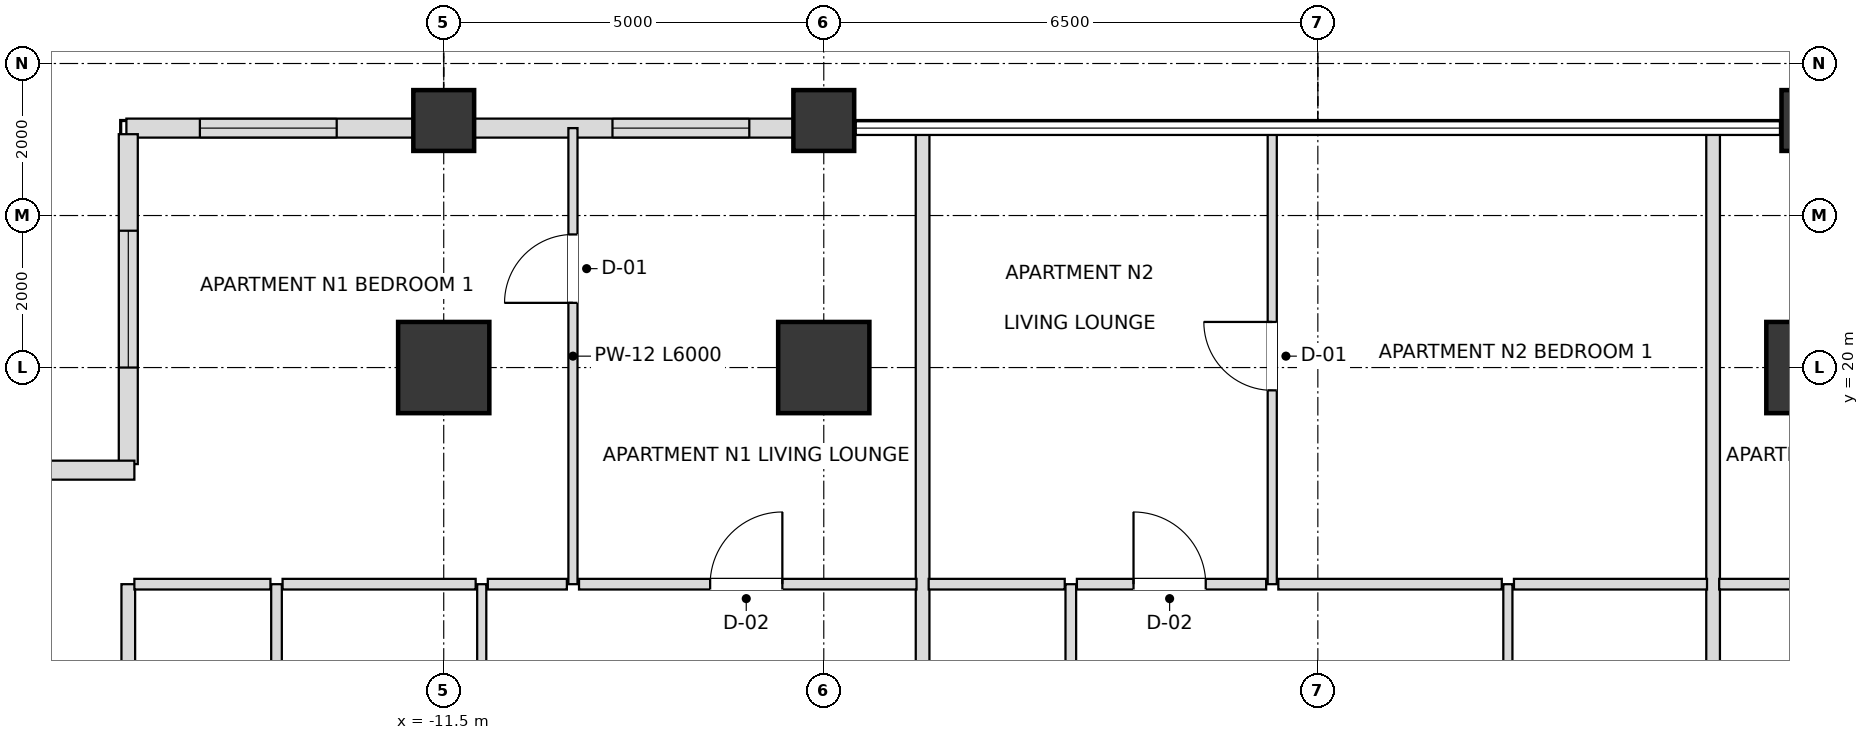
"""IFC4 building model, lengths in metres.
Left out: names, types, materials, properties, quantities, classifications, styles, units other than length and angle.
Written with IfcOpenShell. Run it as: python <this file> out.ifc"""

import sys

from ifc_helpers import new_model, si_unit, direction, frame, frame_2d, origin, origin_2d, place, context, subcontext, project, spatial, rectangle, extrude, element, fill, save


model = new_model("IFC4")
c1 = context("Model", 3, precision=1e-05, world=origin(), true_north=direction((0.0, 1.0)))
c2 = subcontext(c1, "Body", "Model", "MODEL_VIEW")
j1 = project(units=[si_unit("LENGTHUNIT", "METRE"), si_unit("PLANEANGLEUNIT", "RADIAN")], contexts=[c1])
p1 = place(None, origin())
s1 = spatial("IfcSite", under=j1, at=p1, CompositionType="ELEMENT")
p2 = place(p1, origin())
s2 = spatial("IfcBuilding", under=s1, at=p2, CompositionType="ELEMENT")
p3 = place(p2, frame((0.0, 0.0, 109.8)))
s3 = spatial("IfcBuildingStorey", under=s2, at=p3, CompositionType="ELEMENT", Elevation=109.8)
for number, where, z_axis, x_axis in (
    (1, (6.5, 20.0, 0.0), (0.0, 0.0, 1.0), (1.0, 0.0, 0.0)),
    (2, (-6.5, 20.0, 0.0), (0.0, 0.0, 1.0), (1.0, 0.0, 0.0)),
    (3, (-11.5, 20.0, 0.0), (0.0, 0.0, 1.0), (1.0, 0.0, 0.0)),
):
    element("IfcColumn", number, at=place(p3, frame(where, z_axis=z_axis, x_axis=x_axis)), inside=s3, PredefinedType="USERDEFINED", context=c2, shape_type="SweptSolid", body=[
        extrude(rectangle(XDim=1.2, YDim=1.2, at=origin_2d()), origin(), (0.0, 0.0, 1.0), 3.6),
    ])
for number, where, z_axis, x_axis in (
    (4, (-11.5, 23.25, 0.0), (0.0, 0.0, 1.0), (1.0, 0.0, 0.0)),
    (5, (-6.5, 23.25, 0.0), (0.0, 0.0, 1.0), (1.0, 0.0, 0.0)),
    (6, (6.5, 23.25, 0.0), (0.0, 0.0, 1.0), (1.0, 0.0, 0.0)),
):
    element("IfcColumn", number, at=place(p3, frame(where, z_axis=z_axis, x_axis=x_axis)), inside=s3, PredefinedType="COLUMN", context=c2, shape_type="SweptSolid", body=[
        extrude(rectangle(XDim=0.8, YDim=0.8, at=origin_2d()), origin(), (0.0, 0.0, 1.0), 3.6),
    ])
p4 = place(p3, frame((-6.895, 23.15, 0.0), z_axis=(0.0, 0.0, 1.0), x_axis=(-1.0, 0.0, 0.0)))
e7 = element("IfcWall", 7, at=p4, inside=s3, PredefinedType="SOLIDWALL", context=c2, shape_type="SweptSolid", body=[
    extrude(rectangle(XDim=4.21, YDim=0.25, at=frame_2d((2.105, 0.0))), origin(), (0.0, 0.0, 1.0), 2.736),
])
p5 = place(p4, frame((0.585, 0.0, 0.72)))
e8 = element("IfcOpeningElement", 8, at=p5, cuts=e7, PredefinedType="OPENING", context=c2, shape_type="SweptSolid", body=[
    extrude(rectangle(XDim=1.8, YDim=1.68, at=frame_2d((0.9, 0.84))), frame((0.0, 0.135, 0.0), z_axis=(0.0, -1.0, 0.0), x_axis=(1.0, 0.0, 0.0)), (0.0, 0.0, 1.0), 0.27),
])
p6 = place(p3, frame((-11.895, 23.15, 0.0), z_axis=(0.0, 0.0, 1.0), x_axis=(-1.0, 0.0, 0.0)))
e9 = element("IfcWall", 9, at=p6, inside=s3, PredefinedType="SOLIDWALL", context=c2, shape_type="SweptSolid", body=[
    extrude(rectangle(XDim=3.78, YDim=0.25, at=frame_2d((1.89, 0.0))), origin(), (0.0, 0.0, 1.0), 2.736),
])
p7 = place(p6, frame((1.013, 0.0, 0.72)))
e10 = element("IfcOpeningElement", 10, at=p7, cuts=e9, PredefinedType="OPENING", context=c2, shape_type="SweptSolid", body=[
    extrude(rectangle(XDim=1.8, YDim=1.68, at=frame_2d((0.9, 0.84))), frame((0.0, 0.135, 0.0), z_axis=(0.0, -1.0, 0.0), x_axis=(1.0, 0.0, 0.0)), (0.0, 0.0, 1.0), 0.27),
])
p8 = place(p3, frame((-15.65, 23.07, 0.0), z_axis=(0.0, 0.0, 1.0), x_axis=(0.0, -1.0, 0.0)))
e11 = element("IfcWall", 11, at=p8, inside=s3, PredefinedType="SOLIDWALL", context=c2, shape_type="SweptSolid", body=[
    extrude(rectangle(XDim=4.34, YDim=0.25, at=frame_2d((2.17, 0.0))), origin(), (0.0, 0.0, 1.0), 2.736),
])
p9 = place(p8, frame((1.27, 0.0, 0.72)))
e12 = element("IfcOpeningElement", 12, at=p9, cuts=e11, PredefinedType="OPENING", context=c2, shape_type="SweptSolid", body=[
    extrude(rectangle(XDim=1.8, YDim=1.68, at=frame_2d((0.9, 0.84))), frame((0.0, 0.135, 0.0), z_axis=(0.0, -1.0, 0.0), x_axis=(1.0, 0.0, 0.0)), (0.0, 0.0, 1.0), 0.27),
])
p10 = place(p3, frame((-15.57, 18.65, 0.0), z_axis=(0.0, 0.0, 1.0), x_axis=(-1.0, 0.0, 0.0)))
e13 = element("IfcWall", 13, at=p10, inside=s3, PredefinedType="SOLIDWALL", context=c2, shape_type="SweptSolid", body=[
    extrude(rectangle(XDim=4.66, YDim=0.25, at=frame_2d((2.33, 0.0))), origin(), (0.0, 0.0, 1.0), 2.736),
])
p11 = place(p10, frame((1.43, 0.0, 0.72)))
e14 = element("IfcOpeningElement", 14, at=p11, cuts=e13, PredefinedType="OPENING", context=c2, shape_type="SweptSolid", body=[
    extrude(rectangle(XDim=1.8, YDim=1.68, at=frame_2d((0.9, 0.84))), frame((0.0, 0.135, 0.0), z_axis=(0.0, -1.0, 0.0), x_axis=(1.0, 0.0, 0.0)), (0.0, 0.0, 1.0), 0.27),
])
p12 = place(p3, frame((-15.65, 9.3, 0.0), z_axis=(0.0, 0.0, 1.0), x_axis=(0.0, 1.0, 0.0)))
e15 = element("IfcWall", 15, at=p12, inside=s3, PredefinedType="PARTITIONING", context=c2, shape_type="SweptSolid", body=[
    extrude(rectangle(XDim=7.85, YDim=0.18, at=frame_2d((3.925, 0.0))), origin(), (0.0, 0.0, 1.0), 2.736),
])
p13 = place(p3, frame((-13.7, 9.3, 0.0), z_axis=(0.0, 0.0, 1.0), x_axis=(0.0, 1.0, 0.0)))
e16 = element("IfcWall", 16, at=p13, inside=s3, PredefinedType="PARTITIONING", context=c2, shape_type="SweptSolid", body=[
    extrude(rectangle(XDim=7.85, YDim=0.14, at=frame_2d((3.925, 0.0))), origin(), (0.0, 0.0, 1.0), 2.736),
])
p14 = place(p13, frame((3.47, 0.0, 0.0)))
e17 = element("IfcOpeningElement", 17, at=p14, cuts=e16, PredefinedType="OPENING", context=c2, shape_type="SweptSolid", body=[
    extrude(rectangle(XDim=0.9, YDim=2.1, at=frame_2d((0.45, 1.05))), frame((0.0, 0.08, 0.0), z_axis=(0.0, -1.0, 0.0), x_axis=(1.0, 0.0, 0.0)), (0.0, 0.0, 1.0), 0.16),
])
p15 = place(p3, frame((-11.0, 9.3, 0.0), z_axis=(0.0, 0.0, 1.0), x_axis=(0.0, 1.0, 0.0)))
e18 = element("IfcWall", 18, at=p15, inside=s3, PredefinedType="PARTITIONING", context=c2, shape_type="SweptSolid", body=[
    extrude(rectangle(XDim=7.85, YDim=0.12, at=frame_2d((3.925, 0.0))), origin(), (0.0, 0.0, 1.0), 2.816),
])
p16 = place(p15, frame((4.219, 0.0, 0.0)))
e19 = element("IfcOpeningElement", 19, at=p16, cuts=e18, PredefinedType="OPENING", context=c2, shape_type="SweptSolid", body=[
    extrude(rectangle(XDim=0.95, YDim=2.1, at=frame_2d((0.475, 1.05))), frame((0.0, 0.07, 0.0), z_axis=(0.0, -1.0, 0.0), x_axis=(1.0, 0.0, 0.0)), (0.0, 0.0, 1.0), 0.14),
])
p17 = place(p3, frame((-9.8, 17.15, 0.0), z_axis=(0.0, 0.0, 1.0), x_axis=(0.0, 1.0, 0.0)))
e20 = element("IfcWall", 20, at=p17, inside=s3, PredefinedType="PARTITIONING", context=c2, shape_type="SweptSolid", body=[
    extrude(rectangle(XDim=6.0, YDim=0.12, at=frame_2d((3.0, 0.0))), origin(), (0.0, 0.0, 1.0), 2.816),
])
p18 = place(p17, frame((3.701, 0.0, 0.0)))
e21 = element("IfcOpeningElement", 21, at=p18, cuts=e20, PredefinedType="OPENING", context=c2, shape_type="SweptSolid", body=[
    extrude(rectangle(XDim=0.9, YDim=2.1, at=frame_2d((0.45, 1.05))), frame((0.0, 0.07, 0.0), z_axis=(0.0, -1.0, 0.0), x_axis=(1.0, 0.0, 0.0)), (0.0, 0.0, 1.0), 0.14),
])
p19 = place(p3, frame((-5.2, 9.3, 0.0), z_axis=(0.0, 0.0, 1.0), x_axis=(0.0, 1.0, 0.0)))
e22 = element("IfcWall", 22, at=p19, inside=s3, PredefinedType="PARTITIONING", context=c2, shape_type="SweptSolid", body=[
    extrude(rectangle(XDim=13.85, YDim=0.18, at=frame_2d((6.925, 0.0))), origin(), (0.0, 0.0, 1.0), 2.816),
])
p20 = place(p3, frame((-3.25, 9.3, 0.0), z_axis=(0.0, 0.0, 1.0), x_axis=(0.0, 1.0, 0.0)))
e23 = element("IfcWall", 23, at=p20, inside=s3, PredefinedType="PARTITIONING", context=c2, shape_type="SweptSolid", body=[
    extrude(rectangle(XDim=7.85, YDim=0.14, at=frame_2d((3.925, 0.0))), origin(), (0.0, 0.0, 1.0), 3.38),
])
p21 = place(p20, frame((3.47, 0.0, 0.0)))
e24 = element("IfcOpeningElement", 24, at=p21, cuts=e23, PredefinedType="OPENING", context=c2, shape_type="SweptSolid", body=[
    extrude(rectangle(XDim=0.9, YDim=2.1, at=frame_2d((0.45, 1.05))), frame((0.0, 0.08, 0.0), z_axis=(0.0, -1.0, 0.0), x_axis=(1.0, 0.0, 0.0)), (0.0, 0.0, 1.0), 0.16),
])
p22 = place(p3, frame((-0.6, 17.15, 0.0), z_axis=(0.0, 0.0, 1.0), x_axis=(0.0, 1.0, 0.0)))
e25 = element("IfcWall", 25, at=p22, inside=s3, PredefinedType="PARTITIONING", context=c2, shape_type="SweptSolid", body=[
    extrude(rectangle(XDim=6.0, YDim=0.12, at=frame_2d((3.0, 0.0))), origin(), (0.0, 0.0, 1.0), 2.816),
])
p23 = place(p22, frame((2.55, 0.0, 0.0)))
e26 = element("IfcOpeningElement", 26, at=p23, cuts=e25, PredefinedType="OPENING", context=c2, shape_type="SweptSolid", body=[
    extrude(rectangle(XDim=0.9, YDim=2.1, at=frame_2d((0.45, 1.05))), frame((0.0, 0.07, 0.0), z_axis=(0.0, -1.0, 0.0), x_axis=(1.0, 0.0, 0.0)), (0.0, 0.0, 1.0), 0.14),
])
p24 = place(p3, frame((2.5, 9.3, 0.0), z_axis=(0.0, 0.0, 1.0), x_axis=(0.0, 1.0, 0.0)))
e27 = element("IfcWall", 27, at=p24, inside=s3, PredefinedType="PARTITIONING", context=c2, shape_type="SweptSolid", body=[
    extrude(rectangle(XDim=7.85, YDim=0.12, at=frame_2d((3.925, 0.0))), origin(), (0.0, 0.0, 1.0), 3.38),
])
p25 = place(p24, frame((3.445, 0.0, 0.0)))
e28 = element("IfcOpeningElement", 28, at=p25, cuts=e27, PredefinedType="OPENING", context=c2, shape_type="SweptSolid", body=[
    extrude(rectangle(XDim=0.95, YDim=2.1, at=frame_2d((0.475, 1.05))), frame((0.0, 0.07, 0.0), z_axis=(0.0, -1.0, 0.0), x_axis=(1.0, 0.0, 0.0)), (0.0, 0.0, 1.0), 0.14),
])
p26 = place(p3, frame((5.2, 9.3, 0.0), z_axis=(0.0, 0.0, 1.0), x_axis=(0.0, 1.0, 0.0)))
e29 = element("IfcWall", 29, at=p26, inside=s3, PredefinedType="PARTITIONING", context=c2, shape_type="SweptSolid", body=[
    extrude(rectangle(XDim=13.85, YDim=0.18, at=frame_2d((6.925, 0.0))), origin(), (0.0, 0.0, 1.0), 2.816),
])
p27 = place(p3, frame((-15.57, 17.15, 0.0), z_axis=(0.0, 0.0, 1.0), x_axis=(1.0, 0.0, 0.0)))
e30 = element("IfcWall", 30, at=p27, inside=s3, PredefinedType="PARTITIONING", context=c2, shape_type="SweptSolid", body=[
    extrude(rectangle(XDim=1.79, YDim=0.14, at=frame_2d((0.895, 0.0))), origin(), (0.0, 0.0, 1.0), 2.736),
])
p28 = place(p3, frame((-13.62, 17.15, 0.0), z_axis=(0.0, 0.0, 1.0), x_axis=(1.0, 0.0, 0.0)))
e31 = element("IfcWall", 31, at=p28, inside=s3, PredefinedType="PARTITIONING", context=c2, shape_type="SweptSolid", body=[
    extrude(rectangle(XDim=2.54, YDim=0.14, at=frame_2d((1.27, 0.0))), origin(), (0.0, 0.0, 1.0), 2.736),
])
p29 = place(p3, frame((-10.92, 17.15, 0.0), z_axis=(0.0, 0.0, 1.0), x_axis=(1.0, 0.0, 0.0)))
e32 = element("IfcWall", 32, at=p29, inside=s3, PredefinedType="PARTITIONING", context=c2, shape_type="SweptSolid", body=[
    extrude(rectangle(XDim=1.04, YDim=0.14, at=frame_2d((0.52, 0.0))), origin(), (0.0, 0.0, 1.0), 3.38),
])
p30 = place(p3, frame((-9.72, 17.15, 0.0), z_axis=(0.0, 0.0, 1.0), x_axis=(1.0, 0.0, 0.0)))
e33 = element("IfcWall", 33, at=p30, inside=s3, PredefinedType="PARTITIONING", context=c2, shape_type="SweptSolid", body=[
    extrude(rectangle(XDim=4.44, YDim=0.14, at=frame_2d((2.22, 0.0))), origin(), (0.0, 0.0, 1.0), 2.816),
])
p31 = place(p30, frame((1.725, 0.0, 0.0)))
e34 = element("IfcOpeningElement", 34, at=p31, cuts=e33, PredefinedType="OPENING", context=c2, shape_type="SweptSolid", body=[
    extrude(rectangle(XDim=0.95, YDim=2.1, at=frame_2d((0.475, 1.05))), frame((0.0, 0.08, 0.0), z_axis=(0.0, -1.0, 0.0), x_axis=(1.0, 0.0, 0.0)), (0.0, 0.0, 1.0), 0.16),
])
p32 = place(p3, frame((-5.12, 17.15, 0.0), z_axis=(0.0, 0.0, 1.0), x_axis=(1.0, 0.0, 0.0)))
e35 = element("IfcWall", 35, at=p32, inside=s3, PredefinedType="PARTITIONING", context=c2, shape_type="SweptSolid", body=[
    extrude(rectangle(XDim=1.79, YDim=0.14, at=frame_2d((0.895, 0.0))), origin(), (0.0, 0.0, 1.0), 3.38),
])
p33 = place(p3, frame((-3.17, 17.15, 0.0), z_axis=(0.0, 0.0, 1.0), x_axis=(1.0, 0.0, 0.0)))
e36 = element("IfcWall", 36, at=p33, inside=s3, PredefinedType="PARTITIONING", context=c2, shape_type="SweptSolid", body=[
    extrude(rectangle(XDim=2.49, YDim=0.14, at=frame_2d((1.245, 0.0))), origin(), (0.0, 0.0, 1.0), 3.38),
])
p34 = place(p33, frame((0.745, 0.0, 0.0)))
e37 = element("IfcOpeningElement", 37, at=p34, cuts=e36, PredefinedType="OPENING", context=c2, shape_type="SweptSolid", body=[
    extrude(rectangle(XDim=0.95, YDim=2.1, at=frame_2d((0.475, 1.05))), frame((0.0, 0.08, 0.0), z_axis=(0.0, -1.0, 0.0), x_axis=(1.0, 0.0, 0.0)), (0.0, 0.0, 1.0), 0.16),
])
p35 = place(p3, frame((-0.52, 17.15, 0.0), z_axis=(0.0, 0.0, 1.0), x_axis=(1.0, 0.0, 0.0)))
e38 = element("IfcWall", 38, at=p35, inside=s3, PredefinedType="PARTITIONING", context=c2, shape_type="SweptSolid", body=[
    extrude(rectangle(XDim=2.94, YDim=0.14, at=frame_2d((1.47, 0.0))), origin(), (0.0, 0.0, 1.0), 3.38),
])
p36 = place(p3, frame((2.58, 17.15, 0.0), z_axis=(0.0, 0.0, 1.0), x_axis=(1.0, 0.0, 0.0)))
e39 = element("IfcWall", 39, at=p36, inside=s3, PredefinedType="PARTITIONING", context=c2, shape_type="SweptSolid", body=[
    extrude(rectangle(XDim=2.54, YDim=0.14, at=frame_2d((1.27, 0.0))), origin(), (0.0, 0.0, 1.0), 3.38),
])
p37 = place(p3, frame((5.28, 17.15, 0.0), z_axis=(0.0, 0.0, 1.0), x_axis=(1.0, 0.0, 0.0)))
e40 = element("IfcWall", 40, at=p37, inside=s3, PredefinedType="PARTITIONING", context=c2, shape_type="SweptSolid", body=[
    extrude(rectangle(XDim=4.44, YDim=0.14, at=frame_2d((2.22, 0.0))), origin(), (0.0, 0.0, 1.0), 2.816),
])
p38 = place(p37, frame((1.765, 0.0, 0.0)))
e41 = element("IfcOpeningElement", 41, at=p38, cuts=e40, PredefinedType="OPENING", context=c2, shape_type="SweptSolid", body=[
    extrude(rectangle(XDim=0.95, YDim=2.1, at=frame_2d((0.475, 1.05))), frame((0.0, 0.08, 0.0), z_axis=(0.0, -1.0, 0.0), x_axis=(1.0, 0.0, 0.0)), (0.0, 0.0, 1.0), 0.16),
])
p39 = place(p5, origin())
e42 = element("IfcWindow", 42, at=p39, inside=s3, PartitioningType="SINGLE_PANEL", PredefinedType="WINDOW", context=c2, shape_type="SweptSolid", body=[
    extrude(rectangle(XDim=1.8, YDim=1.68, at=frame_2d((0.9, 0.84))), frame((0.0, 0.03, 0.0), z_axis=(0.0, -1.0, 0.0), x_axis=(1.0, 0.0, 0.0)), (0.0, 0.0, 1.0), 0.06),
])
fill(e8, e42)
p40 = place(p7, origin())
e43 = element("IfcWindow", 43, at=p40, inside=s3, PartitioningType="SINGLE_PANEL", PredefinedType="WINDOW", context=c2, shape_type="SweptSolid", body=[
    extrude(rectangle(XDim=1.8, YDim=1.68, at=frame_2d((0.9, 0.84))), frame((0.0, 0.03, 0.0), z_axis=(0.0, -1.0, 0.0), x_axis=(1.0, 0.0, 0.0)), (0.0, 0.0, 1.0), 0.06),
])
fill(e10, e43)
p41 = place(p9, origin())
e44 = element("IfcWindow", 44, at=p41, inside=s3, PartitioningType="SINGLE_PANEL", PredefinedType="WINDOW", context=c2, shape_type="SweptSolid", body=[
    extrude(rectangle(XDim=1.8, YDim=1.68, at=frame_2d((0.9, 0.84))), frame((0.0, 0.03, 0.0), z_axis=(0.0, -1.0, 0.0), x_axis=(1.0, 0.0, 0.0)), (0.0, 0.0, 1.0), 0.06),
])
fill(e12, e44)
p42 = place(p31, origin())
e45 = element("IfcDoor", 45, at=p42, inside=s3, OperationType="SINGLE_SWING_RIGHT", PredefinedType="DOOR", context=c2, shape_type="SweptSolid", body=[
    extrude(rectangle(XDim=0.95, YDim=2.1, at=frame_2d((0.475, 1.05))), frame((0.0, 0.025, 0.0), z_axis=(0.0, -1.0, 0.0), x_axis=(1.0, 0.0, 0.0)), (0.0, 0.0, 1.0), 0.05),
])
fill(e34, e45)
p43 = place(p18, origin())
e46 = element("IfcDoor", 46, at=p43, inside=s3, OperationType="SINGLE_SWING_LEFT", PredefinedType="DOOR", context=c2, shape_type="SweptSolid", body=[
    extrude(rectangle(XDim=0.9, YDim=2.1, at=frame_2d((0.45, 1.05))), frame((0.0, 0.025, 0.0), z_axis=(0.0, -1.0, 0.0), x_axis=(1.0, 0.0, 0.0)), (0.0, 0.0, 1.0), 0.05),
])
fill(e21, e46)
p44 = place(p34, origin())
e47 = element("IfcDoor", 47, at=p44, inside=s3, OperationType="SINGLE_SWING_LEFT", PredefinedType="DOOR", context=c2, shape_type="SweptSolid", body=[
    extrude(rectangle(XDim=0.95, YDim=2.1, at=frame_2d((0.475, 1.05))), frame((0.0, 0.025, 0.0), z_axis=(0.0, -1.0, 0.0), x_axis=(1.0, 0.0, 0.0)), (0.0, 0.0, 1.0), 0.05),
])
fill(e37, e47)
p45 = place(p23, origin())
e48 = element("IfcDoor", 48, at=p45, inside=s3, OperationType="SINGLE_SWING_RIGHT", PredefinedType="DOOR", context=c2, shape_type="SweptSolid", body=[
    extrude(rectangle(XDim=0.9, YDim=2.1, at=frame_2d((0.45, 1.05))), frame((0.0, 0.025, 0.0), z_axis=(0.0, -1.0, 0.0), x_axis=(1.0, 0.0, 0.0)), (0.0, 0.0, 1.0), 0.05),
])
fill(e26, e48)
save(model, sys.argv[1])
